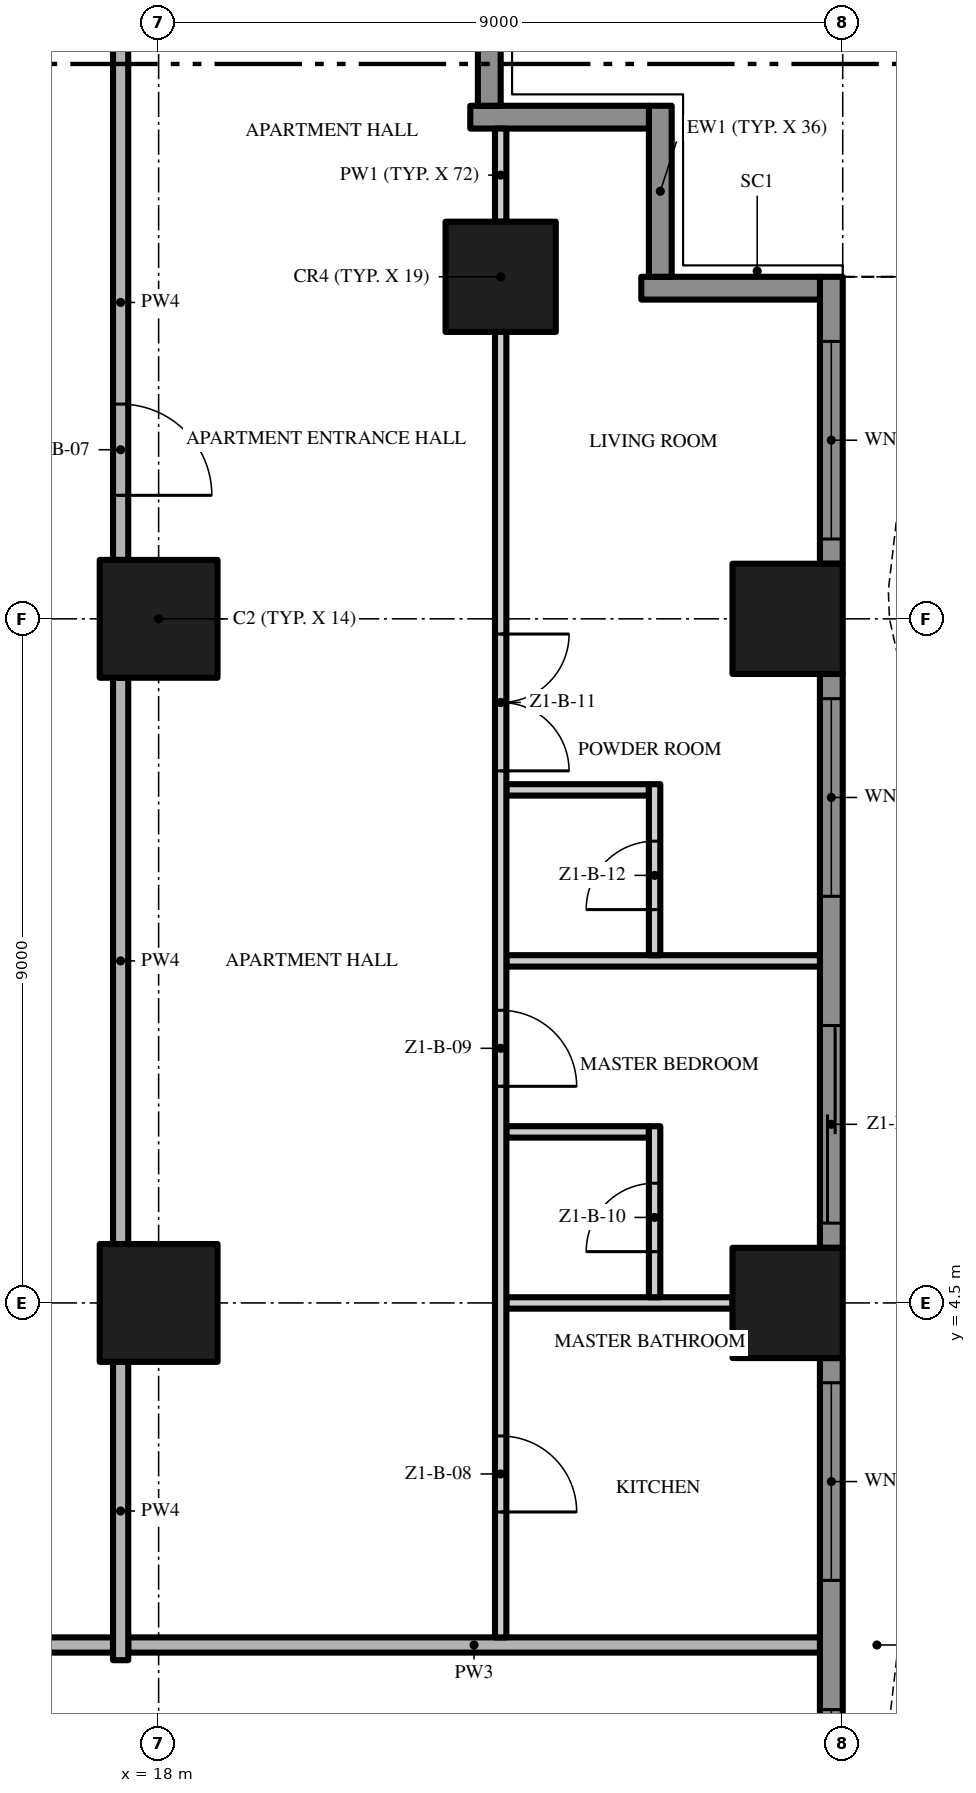
"""IFC4 building model, lengths in metres.
Left out: names, types, materials, properties, quantities, classifications, styles, units other than length and angle.
Written with IfcOpenShell. Run it as: python <this file> out.ifc"""

import sys

from ifc_helpers import new_model, si_unit, direction, frame, frame_2d, origin, origin_2d, place, context, subcontext, project, spatial, polyline, rectangle, outline, extrude, element, fill, save


model = new_model("IFC4")
c1 = context("Model", 3, precision=1e-05, world=origin(), true_north=direction((0.0, 1.0)))
c2 = subcontext(c1, "Body", "Model", "MODEL_VIEW")
j1 = project(units=[si_unit("LENGTHUNIT", "METRE"), si_unit("PLANEANGLEUNIT", "RADIAN")], contexts=[c1])
p1 = place(None, origin())
s1 = spatial("IfcSite", under=j1, at=p1, CompositionType="ELEMENT")
p2 = place(p1, origin())
s2 = spatial("IfcBuilding", under=s1, at=p2, CompositionType="ELEMENT")
p3 = place(p2, frame((0.0, 0.0, 34.0)))
s3 = spatial("IfcBuildingStorey", under=s2, at=p3, CompositionType="ELEMENT", Elevation=34.0)
for number, where, z_axis, x_axis in (
    (1, (18.0, 13.5, 0.0), (0.0, 0.0, 1.0), (1.0, 0.0, 0.0)),
    (2, (18.0, 4.5, 0.0), (0.0, 0.0, 1.0), (1.0, 0.0, 0.0)),
):
    element("IfcColumn", number, at=place(p3, frame(where, z_axis=z_axis, x_axis=x_axis)), inside=s3, PredefinedType="COLUMN", context=c2, shape_type="SweptSolid", body=[
        extrude(rectangle(XDim=1.55, YDim=1.55, at=origin_2d()), origin(), (0.0, 0.0, 1.0), 3.5),
    ])
for number, where, z_axis, x_axis in (
    (3, (26.275, 13.5, 0.0), (0.0, 0.0, 1.0), (1.0, 0.0, 0.0)),
    (4, (22.5, 18.0, 0.0), (0.0, 0.0, 1.0), (1.0, 0.0, 0.0)),
    (5, (26.275, 4.5, 0.0), (0.0, 0.0, 1.0), (1.0, 0.0, 0.0)),
):
    element("IfcColumn", number, at=place(p3, frame(where, z_axis=z_axis, x_axis=x_axis)), inside=s3, PredefinedType="COLUMN", context=c2, shape_type="SweptSolid", body=[
        extrude(rectangle(XDim=1.45, YDim=1.45, at=origin_2d()), origin(), (0.0, 0.0, 1.0), 3.5),
    ])
p4 = place(p3, frame((26.85, 3.775, 0.0), z_axis=(0.0, 0.0, 1.0), x_axis=(0.0, -1.0, 0.0)))
e6 = element("IfcWall", 6, at=p4, inside=s3, PredefinedType="SOLIDWALL", context=c2, shape_type="SweptSolid", body=[
    extrude(rectangle(XDim=7.55, YDim=0.3, at=frame_2d((3.775, 0.0))), origin(), (0.0, 0.0, 1.0), 3.5),
])
p5 = place(p4, frame((4.625, 0.0, 0.45)))
e7 = element("IfcOpeningElement", 7, at=p5, cuts=e6, PredefinedType="OPENING", context=c2, shape_type="SweptSolid", body=[
    extrude(rectangle(XDim=2.6, YDim=2.65, at=frame_2d((1.3, 1.325))), frame((0.0, 0.16, 0.0), z_axis=(0.0, -1.0, 0.0), x_axis=(1.0, 0.0, 0.0)), (0.0, 0.0, 1.0), 0.32),
])
p6 = place(p4, frame((0.325, 0.0, 0.45)))
e8 = element("IfcOpeningElement", 8, at=p6, cuts=e6, PredefinedType="OPENING", context=c2, shape_type="SweptSolid", body=[
    extrude(rectangle(XDim=2.6, YDim=2.65, at=frame_2d((1.3, 1.325))), frame((0.0, 0.16, 0.0), z_axis=(0.0, -1.0, 0.0), x_axis=(1.0, 0.0, 0.0)), (0.0, 0.0, 1.0), 0.32),
])
p7 = place(p3, frame((26.85, 12.775, 0.0), z_axis=(0.0, 0.0, 1.0), x_axis=(0.0, -1.0, 0.0)))
e9 = element("IfcWall", 9, at=p7, inside=s3, PredefinedType="SOLIDWALL", context=c2, shape_type="SweptSolid", body=[
    extrude(rectangle(XDim=7.55, YDim=0.3, at=frame_2d((3.775, 0.0))), origin(), (0.0, 0.0, 1.0), 3.5),
])
p8 = place(p7, frame((4.625, 0.0, 0.0)))
e10 = element("IfcOpeningElement", 10, at=p8, cuts=e9, PredefinedType="OPENING", context=c2, shape_type="SweptSolid", body=[
    extrude(rectangle(XDim=2.6, YDim=2.4, at=frame_2d((1.3, 1.2))), frame((0.0, 0.16, 0.0), z_axis=(0.0, -1.0, 0.0), x_axis=(1.0, 0.0, 0.0)), (0.0, 0.0, 1.0), 0.32),
])
p9 = place(p7, frame((0.325, 0.0, 0.45)))
e11 = element("IfcOpeningElement", 11, at=p9, cuts=e9, PredefinedType="OPENING", context=c2, shape_type="SweptSolid", body=[
    extrude(rectangle(XDim=2.6, YDim=2.65, at=frame_2d((1.3, 1.325))), frame((0.0, 0.16, 0.0), z_axis=(0.0, -1.0, 0.0), x_axis=(1.0, 0.0, 0.0)), (0.0, 0.0, 1.0), 0.32),
])
p10 = place(p3, frame((26.85, 18.0, 0.0), z_axis=(0.0, 0.0, 1.0), x_axis=(0.0, -1.0, 0.0)))
e12 = element("IfcWall", 12, at=p10, inside=s3, PredefinedType="SOLIDWALL", context=c2, shape_type="SweptSolid", body=[
    extrude(rectangle(XDim=3.775, YDim=0.3, at=frame_2d((1.887, 0.0))), origin(), (0.0, 0.0, 1.0), 3.5),
])
p11 = place(p10, frame((0.85, 0.0, 0.45)))
e13 = element("IfcOpeningElement", 13, at=p11, cuts=e12, PredefinedType="OPENING", context=c2, shape_type="SweptSolid", body=[
    extrude(rectangle(XDim=2.6, YDim=2.65, at=frame_2d((1.3, 1.325))), frame((0.0, 0.16, 0.0), z_axis=(0.0, -1.0, 0.0), x_axis=(1.0, 0.0, 0.0)), (0.0, 0.0, 1.0), 0.32),
])
p12 = place(p3, frame((24.35, 17.85, 0.0), z_axis=(0.0, 0.0, 1.0), x_axis=(1.0, 0.0, 0.0)))
e14 = element("IfcWall", 14, at=p12, inside=s3, PredefinedType="SOLIDWALL", context=c2, shape_type="SweptSolid", body=[
    extrude(rectangle(XDim=2.35, YDim=0.3, at=frame_2d((1.175, 0.0))), origin(), (0.0, 0.0, 1.0), 3.5),
])
p13 = place(p3, frame((24.6, 20.25, 0.0), z_axis=(0.0, 0.0, 1.0), x_axis=(0.0, -1.0, 0.0)))
e15 = element("IfcWall", 15, at=p13, inside=s3, PredefinedType="SOLIDWALL", context=c2, shape_type="SweptSolid", body=[
    extrude(rectangle(XDim=2.25, YDim=0.3, at=frame_2d((1.125, 0.0))), origin(), (0.0, 0.0, 1.0), 3.5),
])
p14 = place(p3, frame((22.1, 20.1, 0.0), z_axis=(0.0, 0.0, 1.0), x_axis=(1.0, 0.0, 0.0)))
e16 = element("IfcWall", 16, at=p14, inside=s3, PredefinedType="SOLIDWALL", context=c2, shape_type="SweptSolid", body=[
    extrude(rectangle(XDim=2.35, YDim=0.3, at=frame_2d((1.175, 0.0))), origin(), (0.0, 0.0, 1.0), 3.5),
])
p15 = place(p3, frame((22.35, 22.5, 0.0), z_axis=(0.0, 0.0, 1.0), x_axis=(0.0, -1.0, 0.0)))
e17 = element("IfcWall", 17, at=p15, inside=s3, PredefinedType="SOLIDWALL", context=c2, shape_type="SweptSolid", body=[
    extrude(rectangle(XDim=2.25, YDim=0.3, at=frame_2d((1.125, 0.0))), origin(), (0.0, 0.0, 1.0), 3.5),
])
p16 = place(p3, origin())
e18 = element("IfcWall", 18, at=p16, inside=s3, PredefinedType="USERDEFINED", context=c2, shape_type="SweptSolid", body=[
    extrude(outline(polyline([(27.951, -18.0), (27.615, -16.5), (27.6, -16.125), (27.731, -15.0), (28.255, -13.5), (28.988, -12.0), (29.649, -10.5), (29.985, -9.0), (30.0, -8.625), (29.869, -7.5), (29.345, -6.0), (28.612, -4.5), (27.951, -3.0), (27.615, -1.5), (27.6, -1.125), (27.731, 0.0), (28.255, 1.5), (28.988, 3.0), (29.649, 4.5), (29.985, 6.0), (30.0, 6.375), (29.869, 7.5), (29.345, 9.0), (28.612, 10.5), (27.951, 12.0), (27.615, 13.5), (27.6, 13.875), (27.731, 15.0), (28.255, 16.5), (28.988, 18.0), (28.763, 18.11), (28.024, 16.596), (27.486, 15.056), (27.349, 13.885), (27.366, 13.467), (27.713, 11.921), (28.385, 10.395), (29.114, 8.904), (29.624, 7.444), (29.749, 6.365), (29.736, 6.033), (29.41, 4.579), (28.761, 3.105), (28.024, 1.596), (27.486, 0.056), (27.349, -1.115), (27.366, -1.533), (27.713, -3.079), (28.385, -4.605), (29.114, -6.096), (29.624, -7.556), (29.749, -8.635), (29.736, -8.967), (29.41, -10.421), (28.761, -11.895), (28.024, -13.404), (27.486, -14.944), (27.349, -16.115), (27.366, -16.533), (27.708, -18.055), (27.951, -18.0)])), origin(), (0.0, 0.0, 1.0), 0.9),
])
p17 = place(p3, frame((17.4, 0.0, 0.0), z_axis=(0.0, 0.0, 1.0), x_axis=(-1.0, 0.0, 0.0)))
e19 = element("IfcWall", 19, at=p17, inside=s3, PredefinedType="PARTITIONING", context=c2, shape_type="SweptSolid", body=[
    extrude(rectangle(XDim=17.3, YDim=0.2, at=frame_2d((8.65, 0.0))), origin(), (0.0, 0.0, 1.0), 3.5),
])
p18 = place(p17, frame((7.65, 0.0, 0.0)))
e20 = element("IfcOpeningElement", 20, at=p18, cuts=e19, PredefinedType="OPENING", context=c2, shape_type="SweptSolid", body=[
    extrude(rectangle(XDim=1.5, YDim=2.4, at=frame_2d((0.75, 1.2))), frame((0.0, 0.11, 0.0), z_axis=(0.0, -1.0, 0.0), x_axis=(1.0, 0.0, 0.0)), (0.0, 0.0, 1.0), 0.22),
])
p19 = place(p3, frame((17.6, 0.0, 0.0), z_axis=(0.0, 0.0, 1.0), x_axis=(1.0, 0.0, 0.0)))
e21 = element("IfcWall", 21, at=p19, inside=s3, PredefinedType="PARTITIONING", context=c2, shape_type="SweptSolid", body=[
    extrude(rectangle(XDim=9.1, YDim=0.2, at=frame_2d((4.55, 0.0))), origin(), (0.0, 0.0, 1.0), 3.5),
])
p20 = place(p3, frame((22.575, 4.5, 0.0), z_axis=(0.0, 0.0, 1.0), x_axis=(1.0, 0.0, 0.0)))
e22 = element("IfcWall", 22, at=p20, inside=s3, PredefinedType="PARTITIONING", context=c2, shape_type="SweptSolid", body=[
    extrude(rectangle(XDim=2.975, YDim=0.15, at=frame_2d((1.488, 0.0))), origin(), (0.0, 0.0, 1.0), 3.5),
])
p21 = place(p3, frame((22.575, 6.75, 0.0), z_axis=(0.0, 0.0, 1.0), x_axis=(1.0, 0.0, 0.0)))
e23 = element("IfcWall", 23, at=p21, inside=s3, PredefinedType="PARTITIONING", context=c2, shape_type="SweptSolid", body=[
    extrude(rectangle(XDim=1.875, YDim=0.15, at=frame_2d((0.938, 0.0))), origin(), (0.0, 0.0, 1.0), 3.5),
])
p22 = place(p3, frame((22.575, 9.0, 0.0), z_axis=(0.0, 0.0, 1.0), x_axis=(1.0, 0.0, 0.0)))
e24 = element("IfcWall", 24, at=p22, inside=s3, PredefinedType="PARTITIONING", context=c2, shape_type="SweptSolid", body=[
    extrude(rectangle(XDim=4.125, YDim=0.15, at=frame_2d((2.062, 0.0))), origin(), (0.0, 0.0, 1.0), 3.5),
])
p23 = place(p3, frame((22.575, 11.25, 0.0), z_axis=(0.0, 0.0, 1.0), x_axis=(1.0, 0.0, 0.0)))
e25 = element("IfcWall", 25, at=p23, inside=s3, PredefinedType="PARTITIONING", context=c2, shape_type="SweptSolid", body=[
    extrude(rectangle(XDim=1.875, YDim=0.15, at=frame_2d((0.938, 0.0))), origin(), (0.0, 0.0, 1.0), 3.5),
])
p24 = place(p3, frame((17.5, -0.2, 0.0), z_axis=(0.0, 0.0, 1.0), x_axis=(0.0, 1.0, 0.0)))
e26 = element("IfcWall", 26, at=p24, inside=s3, PredefinedType="PARTITIONING", context=c2, shape_type="SweptSolid", body=[
    extrude(rectangle(XDim=3.925, YDim=0.2, at=frame_2d((1.962, 0.0))), origin(), (0.0, 0.0, 1.0), 3.5),
])
p25 = place(p3, frame((17.5, 5.275, 0.0), z_axis=(0.0, 0.0, 1.0), x_axis=(0.0, 1.0, 0.0)))
e27 = element("IfcWall", 27, at=p25, inside=s3, PredefinedType="PARTITIONING", context=c2, shape_type="SweptSolid", body=[
    extrude(rectangle(XDim=7.45, YDim=0.2, at=frame_2d((3.725, 0.0))), origin(), (0.0, 0.0, 1.0), 3.5),
])
p26 = place(p3, frame((17.5, 21.05, 0.0), z_axis=(0.0, 0.0, 1.0), x_axis=(0.0, -1.0, 0.0)))
e28 = element("IfcWall", 28, at=p26, inside=s3, PredefinedType="PARTITIONING", context=c2, shape_type="SweptSolid", body=[
    extrude(rectangle(XDim=6.775, YDim=0.2, at=frame_2d((3.388, 0.0))), origin(), (0.0, 0.0, 1.0), 3.5),
])
p27 = place(p26, frame((4.725, 0.0, 0.0)))
e29 = element("IfcOpeningElement", 29, at=p27, cuts=e28, PredefinedType="OPENING", context=c2, shape_type="SweptSolid", body=[
    extrude(rectangle(XDim=1.2, YDim=2.4, at=frame_2d((0.6, 1.2))), frame((0.0, 0.11, 0.0), z_axis=(0.0, -1.0, 0.0), x_axis=(1.0, 0.0, 0.0)), (0.0, 0.0, 1.0), 0.22),
])
p28 = place(p3, frame((22.5, 17.275, 0.0), z_axis=(0.0, 0.0, 1.0), x_axis=(0.0, -1.0, 0.0)))
e30 = element("IfcWall", 30, at=p28, inside=s3, PredefinedType="PARTITIONING", context=c2, shape_type="SweptSolid", body=[
    extrude(rectangle(XDim=17.175, YDim=0.15, at=frame_2d((8.588, 0.0))), origin(), (0.0, 0.0, 1.0), 3.5),
])
p29 = place(p28, frame((14.525, 0.0, 0.0)))
e31 = element("IfcOpeningElement", 31, at=p29, cuts=e30, PredefinedType="OPENING", context=c2, shape_type="SweptSolid", body=[
    extrude(rectangle(XDim=1.0, YDim=2.4, at=frame_2d((0.5, 1.2))), frame((0.0, 0.085, 0.0), z_axis=(0.0, -1.0, 0.0), x_axis=(1.0, 0.0, 0.0)), (0.0, 0.0, 1.0), 0.17),
])
p30 = place(p28, frame((8.925, 0.0, 0.0)))
e32 = element("IfcOpeningElement", 32, at=p30, cuts=e30, PredefinedType="OPENING", context=c2, shape_type="SweptSolid", body=[
    extrude(rectangle(XDim=1.0, YDim=2.4, at=frame_2d((0.5, 1.2))), frame((0.0, 0.085, 0.0), z_axis=(0.0, -1.0, 0.0), x_axis=(1.0, 0.0, 0.0)), (0.0, 0.0, 1.0), 0.17),
])
p31 = place(p28, frame((3.975, 0.0, 0.0)))
e33 = element("IfcOpeningElement", 33, at=p31, cuts=e30, PredefinedType="OPENING", context=c2, shape_type="SweptSolid", body=[
    extrude(rectangle(XDim=1.8, YDim=2.4, at=frame_2d((0.9, 1.2))), frame((0.0, 0.085, 0.0), z_axis=(0.0, -1.0, 0.0), x_axis=(1.0, 0.0, 0.0)), (0.0, 0.0, 1.0), 0.17),
])
p32 = place(p3, frame((22.5, 18.725, 0.0), z_axis=(0.0, 0.0, 1.0), x_axis=(0.0, 1.0, 0.0)))
e34 = element("IfcWall", 34, at=p32, inside=s3, PredefinedType="PARTITIONING", context=c2, shape_type="SweptSolid", body=[
    extrude(rectangle(XDim=1.225, YDim=0.15, at=frame_2d((0.613, 0.0))), origin(), (0.0, 0.0, 1.0), 3.5),
])
p33 = place(p3, frame((24.525, 4.575, 0.0), z_axis=(0.0, 0.0, 1.0), x_axis=(0.0, 1.0, 0.0)))
e35 = element("IfcWall", 35, at=p33, inside=s3, PredefinedType="PARTITIONING", context=c2, shape_type="SweptSolid", body=[
    extrude(rectangle(XDim=2.25, YDim=0.15, at=frame_2d((1.125, 0.0))), origin(), (0.0, 0.0, 1.0), 3.5),
])
p34 = place(p33, frame((0.6, 0.0, 0.0)))
e36 = element("IfcOpeningElement", 36, at=p34, cuts=e35, PredefinedType="OPENING", context=c2, shape_type="SweptSolid", body=[
    extrude(rectangle(XDim=0.9, YDim=2.1, at=frame_2d((0.45, 1.05))), frame((0.0, 0.085, 0.0), z_axis=(0.0, -1.0, 0.0), x_axis=(1.0, 0.0, 0.0)), (0.0, 0.0, 1.0), 0.17),
])
p35 = place(p3, frame((24.525, 9.075, 0.0), z_axis=(0.0, 0.0, 1.0), x_axis=(0.0, 1.0, 0.0)))
e37 = element("IfcWall", 37, at=p35, inside=s3, PredefinedType="PARTITIONING", context=c2, shape_type="SweptSolid", body=[
    extrude(rectangle(XDim=2.25, YDim=0.15, at=frame_2d((1.125, 0.0))), origin(), (0.0, 0.0, 1.0), 3.5),
])
p36 = place(p35, frame((0.6, 0.0, 0.0)))
e38 = element("IfcOpeningElement", 38, at=p36, cuts=e37, PredefinedType="OPENING", context=c2, shape_type="SweptSolid", body=[
    extrude(rectangle(XDim=0.9, YDim=2.1, at=frame_2d((0.45, 1.05))), frame((0.0, 0.085, 0.0), z_axis=(0.0, -1.0, 0.0), x_axis=(1.0, 0.0, 0.0)), (0.0, 0.0, 1.0), 0.17),
])
p37 = place(p5, origin())
e39 = element("IfcWindow", 39, at=p37, inside=s3, PartitioningType="SINGLE_PANEL", PredefinedType="WINDOW", context=c2, shape_type="SweptSolid", body=[
    extrude(rectangle(XDim=2.6, YDim=2.65, at=frame_2d((1.3, 1.325))), frame((0.0, 0.03, 0.0), z_axis=(0.0, -1.0, 0.0), x_axis=(1.0, 0.0, 0.0)), (0.0, 0.0, 1.0), 0.06),
])
fill(e7, e39)
p38 = place(p6, origin())
e40 = element("IfcWindow", 40, at=p38, inside=s3, PartitioningType="SINGLE_PANEL", PredefinedType="WINDOW", context=c2, shape_type="SweptSolid", body=[
    extrude(rectangle(XDim=2.6, YDim=2.65, at=frame_2d((1.3, 1.325))), frame((0.0, 0.03, 0.0), z_axis=(0.0, -1.0, 0.0), x_axis=(1.0, 0.0, 0.0)), (0.0, 0.0, 1.0), 0.06),
])
fill(e8, e40)
p39 = place(p8, origin())
e41 = element("IfcDoor", 41, at=p39, inside=s3, OperationType="SINGLE_SWING_LEFT", PredefinedType="DOOR", context=c2, shape_type="SweptSolid", body=[
    extrude(rectangle(XDim=2.6, YDim=2.4, at=frame_2d((1.3, 1.2))), frame((0.0, 0.025, 0.0), z_axis=(0.0, -1.0, 0.0), x_axis=(1.0, 0.0, 0.0)), (0.0, 0.0, 1.0), 0.05),
])
fill(e10, e41)
p40 = place(p9, origin())
e42 = element("IfcWindow", 42, at=p40, inside=s3, PartitioningType="SINGLE_PANEL", PredefinedType="WINDOW", context=c2, shape_type="SweptSolid", body=[
    extrude(rectangle(XDim=2.6, YDim=2.65, at=frame_2d((1.3, 1.325))), frame((0.0, 0.03, 0.0), z_axis=(0.0, -1.0, 0.0), x_axis=(1.0, 0.0, 0.0)), (0.0, 0.0, 1.0), 0.06),
])
fill(e11, e42)
p41 = place(p11, origin())
e43 = element("IfcWindow", 43, at=p41, inside=s3, PartitioningType="SINGLE_PANEL", PredefinedType="WINDOW", context=c2, shape_type="SweptSolid", body=[
    extrude(rectangle(XDim=2.6, YDim=2.65, at=frame_2d((1.3, 1.325))), frame((0.0, 0.03, 0.0), z_axis=(0.0, -1.0, 0.0), x_axis=(1.0, 0.0, 0.0)), (0.0, 0.0, 1.0), 0.06),
])
fill(e13, e43)
p42 = place(p27, origin())
e44 = element("IfcDoor", 44, at=p42, inside=s3, OperationType="SINGLE_SWING_RIGHT", PredefinedType="DOOR", context=c2, shape_type="SweptSolid", body=[
    extrude(rectangle(XDim=1.2, YDim=2.4, at=frame_2d((0.6, 1.2))), frame((0.0, 0.025, 0.0), z_axis=(0.0, -1.0, 0.0), x_axis=(1.0, 0.0, 0.0)), (0.0, 0.0, 1.0), 0.05),
])
fill(e29, e44)
p43 = place(p29, origin())
e45 = element("IfcDoor", 45, at=p43, inside=s3, OperationType="SINGLE_SWING_RIGHT", PredefinedType="DOOR", context=c2, shape_type="SweptSolid", body=[
    extrude(rectangle(XDim=1.0, YDim=2.4, at=frame_2d((0.5, 1.2))), frame((0.0, 0.025, 0.0), z_axis=(0.0, -1.0, 0.0), x_axis=(1.0, 0.0, 0.0)), (0.0, 0.0, 1.0), 0.05),
])
fill(e31, e45)
p44 = place(p30, origin())
e46 = element("IfcDoor", 46, at=p44, inside=s3, OperationType="SINGLE_SWING_RIGHT", PredefinedType="DOOR", context=c2, shape_type="SweptSolid", body=[
    extrude(rectangle(XDim=1.0, YDim=2.4, at=frame_2d((0.5, 1.2))), frame((0.0, 0.025, 0.0), z_axis=(0.0, -1.0, 0.0), x_axis=(1.0, 0.0, 0.0)), (0.0, 0.0, 1.0), 0.05),
])
fill(e32, e46)
p45 = place(p34, origin())
e47 = element("IfcDoor", 47, at=p45, inside=s3, OperationType="SINGLE_SWING_LEFT", PredefinedType="DOOR", context=c2, shape_type="SweptSolid", body=[
    extrude(rectangle(XDim=0.9, YDim=2.1, at=frame_2d((0.45, 1.05))), frame((0.0, 0.025, 0.0), z_axis=(0.0, -1.0, 0.0), x_axis=(1.0, 0.0, 0.0)), (0.0, 0.0, 1.0), 0.05),
])
fill(e36, e47)
p46 = place(p31, origin())
e48 = element("IfcDoor", 48, at=p46, inside=s3, OperationType="DOUBLE_DOOR_SINGLE_SWING", PredefinedType="DOOR", context=c2, shape_type="SweptSolid", body=[
    extrude(rectangle(XDim=1.8, YDim=2.4, at=frame_2d((0.9, 1.2))), frame((0.0, 0.025, 0.0), z_axis=(0.0, -1.0, 0.0), x_axis=(1.0, 0.0, 0.0)), (0.0, 0.0, 1.0), 0.05),
])
fill(e33, e48)
p47 = place(p36, origin())
e49 = element("IfcDoor", 49, at=p47, inside=s3, OperationType="SINGLE_SWING_LEFT", PredefinedType="DOOR", context=c2, shape_type="SweptSolid", body=[
    extrude(rectangle(XDim=0.9, YDim=2.1, at=frame_2d((0.45, 1.05))), frame((0.0, 0.025, 0.0), z_axis=(0.0, -1.0, 0.0), x_axis=(1.0, 0.0, 0.0)), (0.0, 0.0, 1.0), 0.05),
])
fill(e38, e49)
save(model, sys.argv[1])
